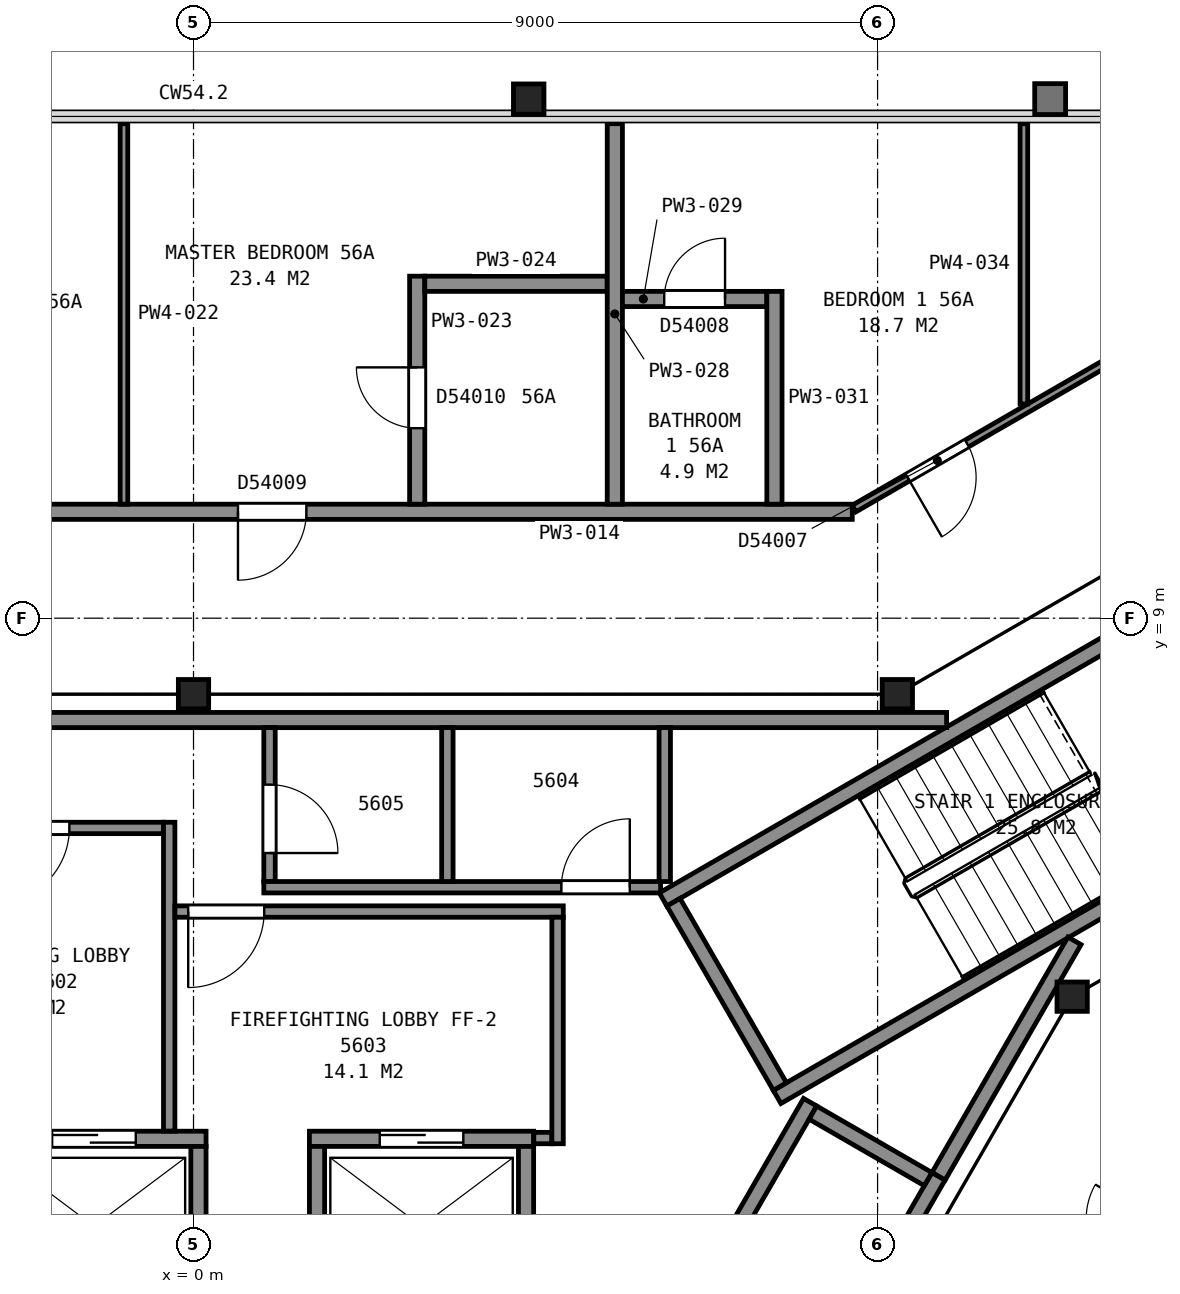
"""IFC4 building model, lengths in metres.
Left out: names, types, materials, properties, quantities, classifications, styles, units other than length and angle.
Written with IfcOpenShell. Run it as: python <this file> out.ifc"""

import sys

from ifc_helpers import new_model, si_unit, direction, frame, frame_2d, origin, origin_2d, place, context, subcontext, project, spatial, rectangle, i_section, extrude, element, fill, save


model = new_model("IFC4")
c1 = context("Model", 3, precision=1e-05, world=origin(), true_north=direction((0.0, 1.0)))
c2 = subcontext(c1, "Body", "Model", "MODEL_VIEW")
j1 = project(units=[si_unit("LENGTHUNIT", "METRE"), si_unit("PLANEANGLEUNIT", "RADIAN")], contexts=[c1])
p1 = place(None, origin())
s1 = spatial("IfcSite", under=j1, at=p1, CompositionType="ELEMENT")
p2 = place(p1, origin())
s2 = spatial("IfcBuilding", under=s1, at=p2, CompositionType="ELEMENT")
p3 = place(p2, frame((0.0, 0.0, 224.9)))
s3 = spatial("IfcBuildingStorey", under=s2, at=p3, CompositionType="ELEMENT", Elevation=224.9)
p4 = place(p3, frame((4.41, 15.83, 0.0), z_axis=(0.0, 0.0, 1.0), x_axis=(1.0, 0.0, 0.0)))
e1 = element("IfcColumn", 1, at=p4, inside=s3, PredefinedType="COLUMN", context=c2, shape_type="SweptSolid", body=[
    extrude(i_section(OverallWidth=0.401, OverallDepth=0.399, WebThickness=0.025, FlangeThickness=0.04, FilletRadius=0.015, at=origin_2d()), origin(), (0.0, 0.0, 1.0), 3.7),
])
for number, where, z_axis, x_axis in (
    (2, (11.56, 4.02, 0.0), (0.0, 0.0, 1.0), (1.0, 0.0, 0.0)),
    (3, (9.26, 8.0, 0.0), (0.0, 0.0, 1.0), (1.0, 0.0, 0.0)),
    (4, (0.0, 8.0, 0.0), (0.0, 0.0, 1.0), (1.0, 0.0, 0.0)),
):
    element("IfcColumn", number, at=place(p3, frame(where, z_axis=z_axis, x_axis=x_axis)), inside=s3, PredefinedType="COLUMN", context=c2, shape_type="SweptSolid", body=[
        extrude(i_section(OverallWidth=0.399, OverallDepth=0.386, WebThickness=0.021, FlangeThickness=0.033, FilletRadius=0.015, at=origin_2d()), origin(), (0.0, 0.0, 1.0), 3.7),
    ])
for number, where, z_axis, x_axis in (
    (5, (6.178, 5.299, 0.0), (0.0, 0.0, 1.0), (0.866, 0.5, 0.0)),
    (6, (7.678, 2.701, 0.0), (0.0, 0.0, 1.0), (0.866, 0.5, 0.0)),
):
    element("IfcWall", number, at=place(p3, frame(where, z_axis=z_axis, x_axis=x_axis)), inside=s3, PredefinedType="PARTITIONING", context=c2, shape_type="SweptSolid", body=[
        extrude(rectangle(XDim=9.6, YDim=0.2, at=frame_2d((4.8, 0.0))), origin(), (0.0, 0.0, 1.0), 3.45),
    ])
p5 = place(p3, frame((7.715, 2.838, 0.0), z_axis=(0.0, 0.0, 1.0), x_axis=(-0.500049511043, 0.865996816683, 0.0)))
e7 = element("IfcWall", 7, at=p5, inside=s3, PredefinedType="PARTITIONING", context=c2, shape_type="SweptSolid", body=[
    extrude(rectangle(XDim=2.8, YDim=0.2, at=frame_2d((1.4, 0.0))), origin(), (0.0, 0.0, 1.0), 3.45),
])
p6 = place(p3, frame((-2.785, 2.15, 0.0), z_axis=(0.0, 0.0, 1.0), x_axis=(1.0, 0.0, 0.0)))
e8 = element("IfcWall", 8, at=p6, inside=s3, PredefinedType="PARTITIONING", context=c2, shape_type="SweptSolid", body=[
    extrude(rectangle(XDim=2.95, YDim=0.2, at=frame_2d((1.475, 0.0))), origin(), (0.0, 0.0, 1.0), 3.7),
])
p7 = place(p6, frame((0.925, 0.0, 0.0)))
e9 = element("IfcOpeningElement", 9, at=p7, cuts=e8, PredefinedType="OPENING", context=c2, shape_type="SweptSolid", body=[
    extrude(rectangle(XDim=1.1, YDim=2.1, at=frame_2d((0.55, 1.05))), frame((0.0, 0.11, 0.0), z_axis=(0.0, -1.0, 0.0), x_axis=(1.0, 0.0, 0.0)), (0.0, 0.0, 1.0), 0.22),
])
p8 = place(p3, frame((1.525, 2.15, 0.0), z_axis=(0.0, 0.0, 1.0), x_axis=(1.0, 0.0, 0.0)))
e10 = element("IfcWall", 10, at=p8, inside=s3, PredefinedType="PARTITIONING", context=c2, shape_type="SweptSolid", body=[
    extrude(rectangle(XDim=2.95, YDim=0.2, at=frame_2d((1.475, 0.0))), origin(), (0.0, 0.0, 1.0), 3.7),
])
p9 = place(p8, frame((0.925, 0.0, 0.0)))
e11 = element("IfcOpeningElement", 11, at=p9, cuts=e10, PredefinedType="OPENING", context=c2, shape_type="SweptSolid", body=[
    extrude(rectangle(XDim=1.1, YDim=2.1, at=frame_2d((0.55, 1.05))), frame((0.0, 0.11, 0.0), z_axis=(0.0, -1.0, 0.0), x_axis=(1.0, 0.0, 0.0)), (0.0, 0.0, 1.0), 0.22),
])
p10 = place(p3, frame((7.351, -2.587, 0.0), z_axis=(0.0, 0.0, 1.0), x_axis=(0.500002801628, 0.866023786258, 0.0)))
e12 = element("IfcWall", 12, at=p10, inside=s3, PredefinedType="PARTITIONING", context=c2, shape_type="SweptSolid", body=[
    extrude(rectangle(XDim=4.9, YDim=0.2, at=frame_2d((2.45, 0.0))), origin(), (0.0, 0.0, 1.0), 3.7),
])
p11 = place(p3, frame((5.663, -1.612, 0.0), z_axis=(0.0, 0.0, 1.0), x_axis=(0.49998122708, 0.866036242063, 0.0)))
e13 = element("IfcWall", 13, at=p11, inside=s3, PredefinedType="PARTITIONING", context=c2, shape_type="SweptSolid", body=[
    extrude(rectangle(XDim=4.9, YDim=0.2, at=frame_2d((2.45, 0.0))), origin(), (0.0, 0.0, 1.0), 3.7),
])
for number, where, z_axis, x_axis in (
    (14, (4.375, 0.1, 0.0), (0.0, 0.0, 1.0), (0.0, 1.0, 0.0)),
    (15, (1.625, 0.1, 0.0), (0.0, 0.0, 1.0), (0.0, 1.0, 0.0)),
    (16, (0.065, 0.1, 0.0), (0.0, 0.0, 1.0), (0.0, 1.0, 0.0)),
):
    element("IfcWall", number, at=place(p3, frame(where, z_axis=z_axis, x_axis=x_axis)), inside=s3, PredefinedType="PARTITIONING", context=c2, shape_type="SweptSolid", body=[
        extrude(rectangle(XDim=1.95, YDim=0.2, at=frame_2d((0.975, 0.0))), origin(), (0.0, 0.0, 1.0), 3.7),
    ])
p12 = place(p3, frame((9.665, 1.62, 0.0), z_axis=(0.0, 0.0, 1.0), x_axis=(-0.866002029911, 0.500040482552, 0.0)))
e17 = element("IfcWall", 17, at=p12, inside=s3, PredefinedType="PARTITIONING", context=c2, shape_type="SweptSolid", body=[
    extrude(rectangle(XDim=1.75, YDim=0.2, at=frame_2d((0.875, 0.0))), origin(), (0.0, 0.0, 1.0), 3.7),
])
p13 = place(p3, frame((-3.933, 6.24, 0.0), z_axis=(0.0, 0.0, 1.0), x_axis=(1.0, 0.0, 0.0)))
e18 = element("IfcWall", 18, at=p13, inside=s3, PredefinedType="PARTITIONING", context=c2, shape_type="SweptSolid", body=[
    extrude(rectangle(XDim=3.538, YDim=0.15, at=frame_2d((1.769, 0.0))), origin(), (0.0, 0.0, 1.0), 3.45),
])
p14 = place(p13, frame((1.3, 0.0, 0.0)))
e19 = element("IfcOpeningElement", 19, at=p14, cuts=e18, PredefinedType="OPENING", context=c2, shape_type="SweptSolid", body=[
    extrude(rectangle(XDim=1.0, YDim=2.1, at=frame_2d((0.5, 1.05))), frame((0.0, 0.085, 0.0), z_axis=(0.0, -1.0, 0.0), x_axis=(1.0, 0.0, 0.0)), (0.0, 0.0, 1.0), 0.17),
])
p15 = place(p3, frame((-3.933, 7.66, 0.0), z_axis=(0.0, 0.0, 1.0), x_axis=(1.0, 0.0, 0.0)))
e20 = element("IfcWall", 20, at=p15, inside=s3, PredefinedType="PARTITIONING", context=c2, shape_type="SweptSolid", body=[
    extrude(rectangle(XDim=13.841, YDim=0.2, at=frame_2d((6.92, 0.0))), origin(), (0.0, 0.0, 1.0), 3.45),
])
p16 = place(p3, frame((-0.32, 2.252, 0.0), z_axis=(0.0, 0.0, 1.0), x_axis=(0.0, 1.0, 0.0)))
e21 = element("IfcWall", 21, at=p16, inside=s3, PredefinedType="PARTITIONING", context=c2, shape_type="SweptSolid", body=[
    extrude(rectangle(XDim=4.063, YDim=0.15, at=frame_2d((2.031, 0.0))), origin(), (0.0, 0.0, 1.0), 3.45),
])
p17 = place(p3, frame((-0.245, 5.14, 0.0), z_axis=(0.0, 0.0, 1.0), x_axis=(1.0, 0.0, 0.0)))
e22 = element("IfcWall", 22, at=p17, inside=s3, PredefinedType="PARTITIONING", context=c2, shape_type="SweptSolid", body=[
    extrude(rectangle(XDim=5.11, YDim=0.15, at=frame_2d((2.555, 0.0))), origin(), (0.0, 0.0, 1.0), 3.45),
])
p18 = place(p17, frame((0.175, 0.0, 0.0)))
e23 = element("IfcOpeningElement", 23, at=p18, cuts=e22, PredefinedType="OPENING", context=c2, shape_type="SweptSolid", body=[
    extrude(rectangle(XDim=1.0, YDim=2.1, at=frame_2d((0.5, 1.05))), frame((0.0, 0.085, 0.0), z_axis=(0.0, -1.0, 0.0), x_axis=(1.0, 0.0, 0.0)), (0.0, 0.0, 1.0), 0.17),
])
p19 = place(p3, frame((1.0, 7.56, 0.0), z_axis=(0.0, 0.0, 1.0), x_axis=(0.0, -1.0, 0.0)))
e24 = element("IfcWall", 24, at=p19, inside=s3, PredefinedType="PARTITIONING", context=c2, shape_type="SweptSolid", body=[
    extrude(rectangle(XDim=2.025, YDim=0.15, at=frame_2d((1.013, 0.0))), origin(), (0.0, 0.0, 1.0), 3.45),
])
p20 = place(p19, frame((0.75, 0.0, 0.0)))
e25 = element("IfcOpeningElement", 25, at=p20, cuts=e24, PredefinedType="OPENING", context=c2, shape_type="SweptSolid", body=[
    extrude(rectangle(XDim=0.9, YDim=2.1, at=frame_2d((0.45, 1.05))), frame((0.0, 0.085, 0.0), z_axis=(0.0, -1.0, 0.0), x_axis=(1.0, 0.0, 0.0)), (0.0, 0.0, 1.0), 0.17),
])
p21 = place(p3, frame((0.925, 5.46, 0.0), z_axis=(0.0, 0.0, 1.0), x_axis=(1.0, 0.0, 0.0)))
e26 = element("IfcWall", 26, at=p21, inside=s3, PredefinedType="PARTITIONING", context=c2, shape_type="SweptSolid", body=[
    extrude(rectangle(XDim=5.22, YDim=0.15, at=frame_2d((2.61, 0.0))), origin(), (0.0, 0.0, 1.0), 3.45),
])
p22 = place(p21, frame((3.915, 0.0, 0.0)))
e27 = element("IfcOpeningElement", 27, at=p22, cuts=e26, PredefinedType="OPENING", context=c2, shape_type="SweptSolid", body=[
    extrude(rectangle(XDim=0.9, YDim=2.1, at=frame_2d((0.45, 1.05))), frame((0.0, 0.085, 0.0), z_axis=(0.0, -1.0, 0.0), x_axis=(1.0, 0.0, 0.0)), (0.0, 0.0, 1.0), 0.17),
])
p23 = place(p3, frame((3.34, 5.535, 0.0), z_axis=(0.0, 0.0, 1.0), x_axis=(0.0, 1.0, 0.0)))
e28 = element("IfcWall", 28, at=p23, inside=s3, PredefinedType="PARTITIONING", context=c2, shape_type="SweptSolid", body=[
    extrude(rectangle(XDim=2.025, YDim=0.15, at=frame_2d((1.013, 0.0))), origin(), (0.0, 0.0, 1.0), 3.45),
])
p24 = place(p3, frame((4.477, 2.16, 0.0), z_axis=(0.0, 0.0, 1.0), x_axis=(1.0, 0.0, 0.0)))
e29 = element("IfcWall", 29, at=p24, inside=s3, PredefinedType="PARTITIONING", context=c2, shape_type="SweptSolid", body=[
    extrude(rectangle(XDim=0.238, YDim=0.15, at=frame_2d((0.119, 0.0))), origin(), (0.0, 0.0, 1.0), 3.45),
])
p25 = place(p3, frame((4.79, 2.085, 0.0), z_axis=(0.0, 0.0, 1.0), x_axis=(0.0, 1.0, 0.0)))
e30 = element("IfcWall", 30, at=p25, inside=s3, PredefinedType="PARTITIONING", context=c2, shape_type="SweptSolid", body=[
    extrude(rectangle(XDim=2.98, YDim=0.15, at=frame_2d((1.49, 0.0))), origin(), (0.0, 0.0, 1.0), 3.45),
])
p26 = place(p3, frame((6.2, 5.535, 0.0), z_axis=(0.0, 0.0, 1.0), x_axis=(0.0, 1.0, 0.0)))
e31 = element("IfcWall", 31, at=p26, inside=s3, PredefinedType="PARTITIONING", context=c2, shape_type="SweptSolid", body=[
    extrude(rectangle(XDim=2.025, YDim=0.15, at=frame_2d((1.013, 0.0))), origin(), (0.0, 0.0, 1.0), 3.45),
])
p27 = place(p3, frame((9.803, 1.658, 0.0), z_axis=(0.0, 0.0, 1.0), x_axis=(0.499943114462, 0.866058244174, 0.0)))
e32 = element("IfcWall", 32, at=p27, inside=s3, PredefinedType="PARTITIONING", context=c2, shape_type="SweptSolid", body=[
    extrude(rectangle(XDim=3.576, YDim=0.2, at=frame_2d((1.788, 0.0))), origin(), (0.0, 0.0, 1.0), 3.45),
])
p28 = place(p3, frame((-8.667, 10.4, 0.0), z_axis=(0.0, 0.0, 1.0), x_axis=(1.0, 0.0, 0.0)))
e33 = element("IfcWall", 33, at=p28, inside=s3, PredefinedType="PARTITIONING", context=c2, shape_type="SweptSolid", body=[
    extrude(rectangle(XDim=17.334, YDim=0.2, at=frame_2d((8.667, 0.0))), origin(), (0.0, 0.0, 1.0), 2.713),
])
p29 = place(p28, frame((9.252, 0.0, 0.0)))
e34 = element("IfcOpeningElement", 34, at=p29, cuts=e33, PredefinedType="OPENING", context=c2, shape_type="SweptSolid", body=[
    extrude(rectangle(XDim=0.9, YDim=2.1, at=frame_2d((0.45, 1.05))), frame((0.0, 0.11, 0.0), z_axis=(0.0, -1.0, 0.0), x_axis=(1.0, 0.0, 0.0)), (0.0, 0.0, 1.0), 0.22),
])
p30 = place(p28, frame((4.851, 0.0, 0.0)))
e35 = element("IfcOpeningElement", 35, at=p30, cuts=e33, PredefinedType="OPENING", context=c2, shape_type="SweptSolid", body=[
    extrude(rectangle(XDim=0.9, YDim=2.1, at=frame_2d((0.45, 1.05))), frame((0.0, 0.11, 0.0), z_axis=(0.0, -1.0, 0.0), x_axis=(1.0, 0.0, 0.0)), (0.0, 0.0, 1.0), 0.22),
])
p31 = place(p3, frame((-0.915, 10.5, 0.0), z_axis=(0.0, 0.0, 1.0), x_axis=(0.0, 1.0, 0.0)))
e36 = element("IfcWall", 36, at=p31, inside=s3, PredefinedType="PARTITIONING", context=c2, shape_type="SweptSolid", body=[
    extrude(rectangle(XDim=5.006, YDim=0.1, at=frame_2d((2.503, 0.0))), origin(), (0.0, 0.0, 1.0), 2.713),
])
p32 = place(p3, frame((2.943, 13.5, 0.0), z_axis=(0.0, 0.0, 1.0), x_axis=(0.0, -1.0, 0.0)))
e37 = element("IfcWall", 37, at=p32, inside=s3, PredefinedType="PARTITIONING", context=c2, shape_type="SweptSolid", body=[
    extrude(rectangle(XDim=3.0, YDim=0.2, at=frame_2d((1.5, 0.0))), origin(), (0.0, 0.0, 1.0), 2.713),
])
p33 = place(p32, frame((1.2, 0.0, 0.0)))
e38 = element("IfcOpeningElement", 38, at=p33, cuts=e37, PredefinedType="OPENING", context=c2, shape_type="SweptSolid", body=[
    extrude(rectangle(XDim=0.8, YDim=2.1, at=frame_2d((0.4, 1.05))), frame((0.0, 0.11, 0.0), z_axis=(0.0, -1.0, 0.0), x_axis=(1.0, 0.0, 0.0)), (0.0, 0.0, 1.0), 0.22),
])
p34 = place(p3, frame((3.043, 13.4, 0.0), z_axis=(0.0, 0.0, 1.0), x_axis=(1.0, 0.0, 0.0)))
e39 = element("IfcWall", 39, at=p34, inside=s3, PredefinedType="PARTITIONING", context=c2, shape_type="SweptSolid", body=[
    extrude(rectangle(XDim=2.4, YDim=0.2, at=frame_2d((1.2, 0.0))), origin(), (0.0, 0.0, 1.0), 2.713),
])
p35 = place(p3, frame((13.342, 2.306, 0.0), z_axis=(0.0, 0.0, 1.0), x_axis=(-0.49997440863, -0.866040178465, 0.0)))
e40 = element("IfcWall", 40, at=p35, inside=s3, PredefinedType="PARTITIONING", context=c2, shape_type="SweptSolid", body=[
    extrude(rectangle(XDim=17.335, YDim=0.1, at=frame_2d((8.667, 0.0))), origin(), (0.0, 0.0, 1.0), 2.713),
])
p36 = place(p35, frame((14.935, 0.0, 0.0)))
e41 = element("IfcOpeningElement", 41, at=p36, cuts=e40, PredefinedType="OPENING", context=c2, shape_type="SweptSolid", body=[
    extrude(rectangle(XDim=0.9, YDim=2.1, at=frame_2d((0.45, 1.05))), frame((0.0, 0.06, 0.0), z_axis=(0.0, -1.0, 0.0), x_axis=(1.0, 0.0, 0.0)), (0.0, 0.0, 1.0), 0.12),
])
p37 = place(p35, frame((10.794, 0.0, 0.0)))
e42 = element("IfcOpeningElement", 42, at=p37, cuts=e40, PredefinedType="OPENING", context=c2, shape_type="SweptSolid", body=[
    extrude(rectangle(XDim=0.9, YDim=2.1, at=frame_2d((0.45, 1.05))), frame((0.0, 0.06, 0.0), z_axis=(0.0, -1.0, 0.0), x_axis=(1.0, 0.0, 0.0)), (0.0, 0.0, 1.0), 0.12),
])
p38 = place(p35, frame((5.866, 0.0, 0.0)))
e43 = element("IfcOpeningElement", 43, at=p38, cuts=e40, PredefinedType="OPENING", context=c2, shape_type="SweptSolid", body=[
    extrude(rectangle(XDim=0.9, YDim=2.1, at=frame_2d((0.45, 1.05))), frame((0.0, 0.06, 0.0), z_axis=(0.0, -1.0, 0.0), x_axis=(1.0, 0.0, 0.0)), (0.0, 0.0, 1.0), 0.12),
])
p39 = place(p35, frame((1.395, 0.0, 0.0)))
e44 = element("IfcOpeningElement", 44, at=p39, cuts=e40, PredefinedType="OPENING", context=c2, shape_type="SweptSolid", body=[
    extrude(rectangle(XDim=0.9, YDim=2.1, at=frame_2d((0.45, 1.05))), frame((0.0, 0.06, 0.0), z_axis=(0.0, -1.0, 0.0), x_axis=(1.0, 0.0, 0.0)), (0.0, 0.0, 1.0), 0.12),
])
p40 = place(p3, frame((5.543, 10.5, 0.0), z_axis=(0.0, 0.0, 1.0), x_axis=(0.0, 1.0, 0.0)))
e45 = element("IfcWall", 45, at=p40, inside=s3, PredefinedType="PARTITIONING", context=c2, shape_type="SweptSolid", body=[
    extrude(rectangle(XDim=5.006, YDim=0.2, at=frame_2d((2.503, 0.0))), origin(), (0.0, 0.0, 1.0), 2.713),
])
p41 = place(p3, frame((7.543, 13.2, 0.0), z_axis=(0.0, 0.0, 1.0), x_axis=(-1.0, 0.0, 0.0)))
e46 = element("IfcWall", 46, at=p41, inside=s3, PredefinedType="PARTITIONING", context=c2, shape_type="SweptSolid", body=[
    extrude(rectangle(XDim=1.9, YDim=0.2, at=frame_2d((0.95, 0.0))), origin(), (0.0, 0.0, 1.0), 2.713),
])
p42 = place(p41, frame((0.55, 0.0, 0.0)))
e47 = element("IfcOpeningElement", 47, at=p42, cuts=e46, PredefinedType="OPENING", context=c2, shape_type="SweptSolid", body=[
    extrude(rectangle(XDim=0.8, YDim=2.1, at=frame_2d((0.4, 1.05))), frame((0.0, 0.11, 0.0), z_axis=(0.0, -1.0, 0.0), x_axis=(1.0, 0.0, 0.0)), (0.0, 0.0, 1.0), 0.22),
])
p43 = place(p3, frame((7.643, 10.5, 0.0), z_axis=(0.0, 0.0, 1.0), x_axis=(0.0, 1.0, 0.0)))
e48 = element("IfcWall", 48, at=p43, inside=s3, PredefinedType="PARTITIONING", context=c2, shape_type="SweptSolid", body=[
    extrude(rectangle(XDim=2.8, YDim=0.2, at=frame_2d((1.4, 0.0))), origin(), (0.0, 0.0, 1.0), 2.713),
])
p44 = place(p3, frame((8.691, 10.442, 0.0), z_axis=(0.0, 0.0, 1.0), x_axis=(0.866070360466, 0.499922124658, 0.0)))
e49 = element("IfcWall", 49, at=p44, inside=s3, PredefinedType="PARTITIONING", context=c2, shape_type="SweptSolid", body=[
    extrude(rectangle(XDim=8.503, YDim=0.1, at=frame_2d((4.251, 0.0))), origin(), (0.0, 0.0, 1.0), 2.713),
])
p45 = place(p44, frame((0.815, 0.0, 0.0)))
e50 = element("IfcOpeningElement", 50, at=p45, cuts=e49, PredefinedType="OPENING", context=c2, shape_type="SweptSolid", body=[
    extrude(rectangle(XDim=0.9, YDim=2.1, at=frame_2d((0.45, 1.05))), frame((0.0, 0.06, 0.0), z_axis=(0.0, -1.0, 0.0), x_axis=(1.0, 0.0, 0.0)), (0.0, 0.0, 1.0), 0.12),
])
p46 = place(p3, frame((10.925, 11.819, 0.0), z_axis=(0.0, 0.0, 1.0), x_axis=(0.0, 1.0, 0.0)))
e51 = element("IfcWall", 51, at=p46, inside=s3, PredefinedType="PARTITIONING", context=c2, shape_type="SweptSolid", body=[
    extrude(rectangle(XDim=3.688, YDim=0.1, at=frame_2d((1.844, 0.0))), origin(), (0.0, 0.0, 1.0), 2.713),
])
p47 = place(p7, origin())
e52 = element("IfcDoor", 52, at=p47, inside=s3, OperationType="SLIDING_TO_LEFT", PredefinedType="DOOR", context=c2, shape_type="SweptSolid", body=[
    extrude(rectangle(XDim=1.1, YDim=2.1, at=frame_2d((0.55, 1.05))), frame((0.0, 0.025, 0.0), z_axis=(0.0, -1.0, 0.0), x_axis=(1.0, 0.0, 0.0)), (0.0, 0.0, 1.0), 0.05),
])
fill(e9, e52)
p48 = place(p9, origin())
e53 = element("IfcDoor", 53, at=p48, inside=s3, OperationType="SLIDING_TO_RIGHT", PredefinedType="DOOR", context=c2, shape_type="SweptSolid", body=[
    extrude(rectangle(XDim=1.1, YDim=2.1, at=frame_2d((0.55, 1.05))), frame((0.0, 0.025, 0.0), z_axis=(0.0, -1.0, 0.0), x_axis=(1.0, 0.0, 0.0)), (0.0, 0.0, 1.0), 0.05),
])
fill(e11, e53)
p49 = place(p14, origin())
e54 = element("IfcDoor", 54, at=p49, inside=s3, OperationType="SINGLE_SWING_LEFT", PredefinedType="DOOR", context=c2, shape_type="SweptSolid", body=[
    extrude(rectangle(XDim=1.0, YDim=2.1, at=frame_2d((0.5, 1.05))), frame((0.0, 0.025, 0.0), z_axis=(0.0, -1.0, 0.0), x_axis=(1.0, 0.0, 0.0)), (0.0, 0.0, 1.0), 0.05),
])
fill(e19, e54)
p50 = place(p18, origin())
e55 = element("IfcDoor", 55, at=p50, inside=s3, OperationType="SINGLE_SWING_LEFT", PredefinedType="DOOR", context=c2, shape_type="SweptSolid", body=[
    extrude(rectangle(XDim=1.0, YDim=2.1, at=frame_2d((0.5, 1.05))), frame((0.0, 0.025, 0.0), z_axis=(0.0, -1.0, 0.0), x_axis=(1.0, 0.0, 0.0)), (0.0, 0.0, 1.0), 0.05),
])
fill(e23, e55)
p51 = place(p20, origin())
e56 = element("IfcDoor", 56, at=p51, inside=s3, OperationType="SINGLE_SWING_RIGHT", PredefinedType="DOOR", context=c2, shape_type="SweptSolid", body=[
    extrude(rectangle(XDim=0.9, YDim=2.1, at=frame_2d((0.45, 1.05))), frame((0.0, 0.025, 0.0), z_axis=(0.0, -1.0, 0.0), x_axis=(1.0, 0.0, 0.0)), (0.0, 0.0, 1.0), 0.05),
])
fill(e25, e56)
p52 = place(p22, origin())
e57 = element("IfcDoor", 57, at=p52, inside=s3, OperationType="SINGLE_SWING_RIGHT", PredefinedType="DOOR", context=c2, shape_type="SweptSolid", body=[
    extrude(rectangle(XDim=0.9, YDim=2.1, at=frame_2d((0.45, 1.05))), frame((0.0, 0.025, 0.0), z_axis=(0.0, -1.0, 0.0), x_axis=(1.0, 0.0, 0.0)), (0.0, 0.0, 1.0), 0.05),
])
fill(e27, e57)
p53 = place(p29, origin())
e58 = element("IfcDoor", 58, at=p53, inside=s3, OperationType="SINGLE_SWING_LEFT", PredefinedType="DOOR", context=c2, shape_type="SweptSolid", body=[
    extrude(rectangle(XDim=0.9, YDim=2.1, at=frame_2d((0.45, 1.05))), frame((0.0, 0.025, 0.0), z_axis=(0.0, -1.0, 0.0), x_axis=(1.0, 0.0, 0.0)), (0.0, 0.0, 1.0), 0.05),
])
fill(e34, e58)
p54 = place(p33, origin())
e59 = element("IfcDoor", 59, at=p54, inside=s3, OperationType="SINGLE_SWING_LEFT", PredefinedType="DOOR", context=c2, shape_type="SweptSolid", body=[
    extrude(rectangle(XDim=0.8, YDim=2.1, at=frame_2d((0.4, 1.05))), frame((0.0, 0.025, 0.0), z_axis=(0.0, -1.0, 0.0), x_axis=(1.0, 0.0, 0.0)), (0.0, 0.0, 1.0), 0.05),
])
fill(e38, e59)
p55 = place(p42, origin())
e60 = element("IfcDoor", 60, at=p55, inside=s3, OperationType="SINGLE_SWING_LEFT", PredefinedType="DOOR", context=c2, shape_type="SweptSolid", body=[
    extrude(rectangle(XDim=0.8, YDim=2.1, at=frame_2d((0.4, 1.05))), frame((0.0, 0.025, 0.0), z_axis=(0.0, -1.0, 0.0), x_axis=(1.0, 0.0, 0.0)), (0.0, 0.0, 1.0), 0.05),
])
fill(e47, e60)
p56 = place(p45, origin())
e61 = element("IfcDoor", 61, at=p56, inside=s3, OperationType="SINGLE_SWING_LEFT", PredefinedType="DOOR", context=c2, shape_type="SweptSolid", body=[
    extrude(rectangle(XDim=0.9, YDim=2.1, at=frame_2d((0.45, 1.05))), frame((0.0, 0.025, 0.0), z_axis=(0.0, -1.0, 0.0), x_axis=(1.0, 0.0, 0.0)), (0.0, 0.0, 1.0), 0.05),
])
fill(e50, e61)
save(model, sys.argv[1])
